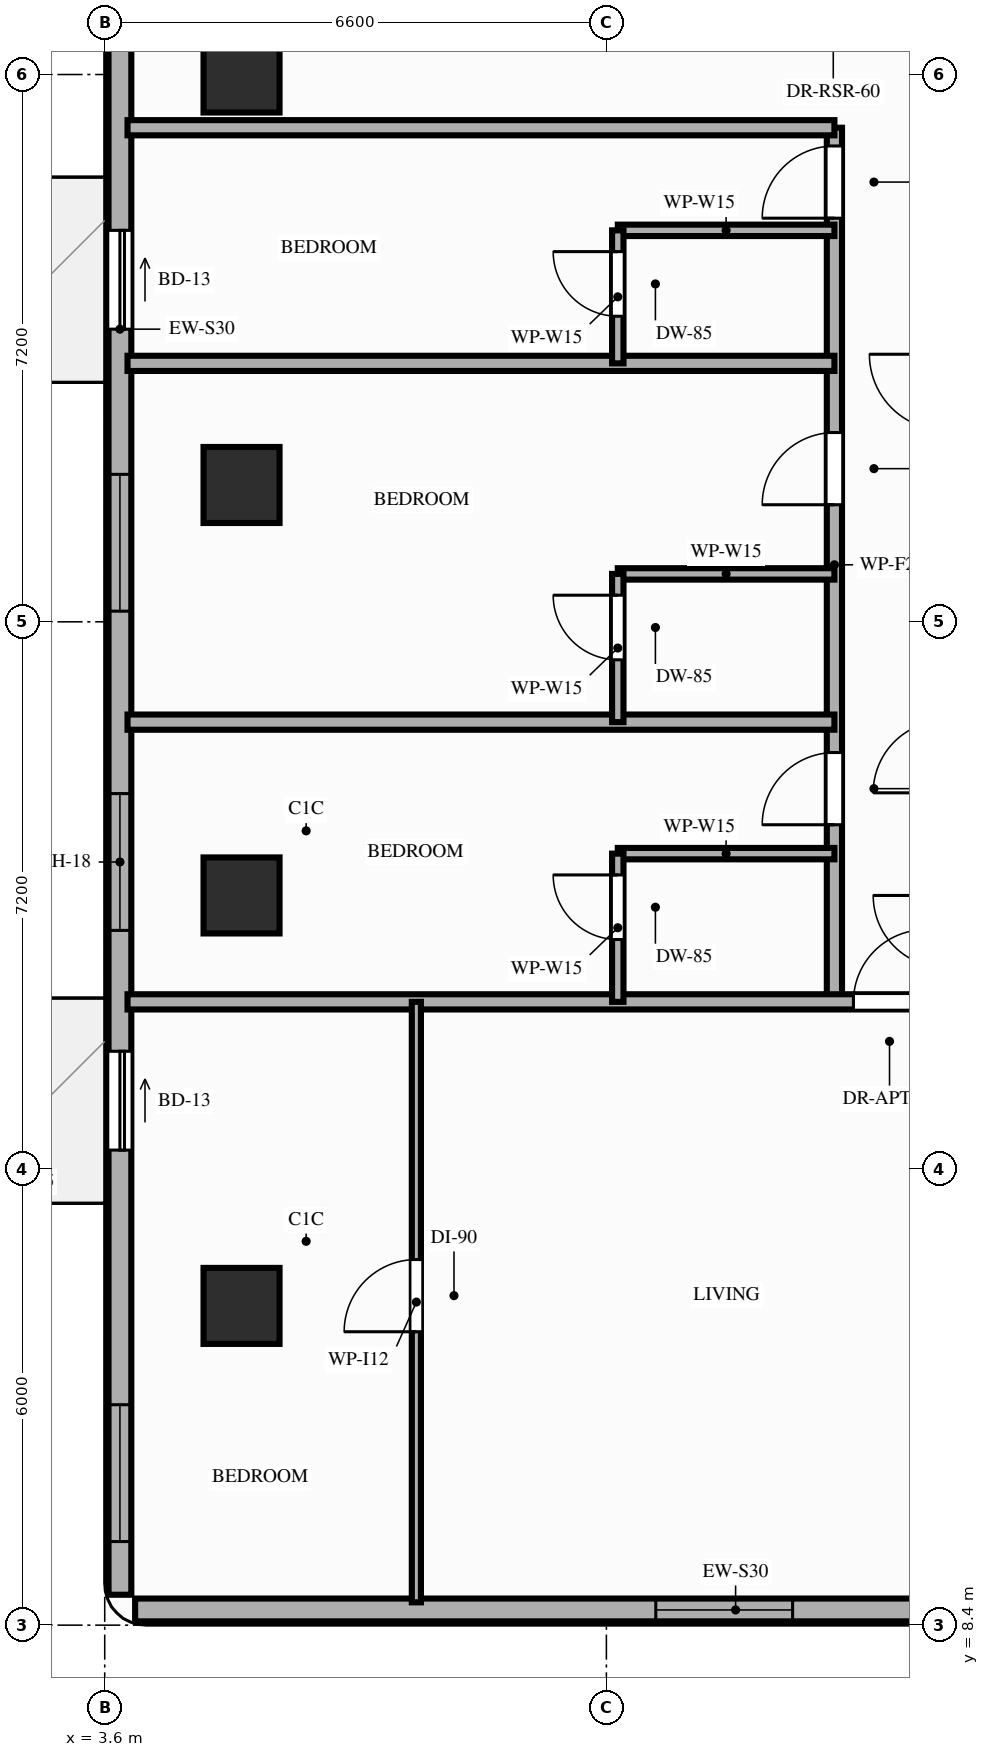
"""IFC4 building model, lengths in metres.
Left out: names, types, materials, properties, quantities, classifications, styles, units other than length and angle.
Written with IfcOpenShell. Run it as: python <this file> out.ifc"""

import sys

from ifc_helpers import new_model, si_unit, direction, frame, frame_2d, origin, origin_2d, place, context, subcontext, project, spatial, rectangle, extrude, element, fill, save


model = new_model("IFC4")
c1 = context("Model", 3, precision=1e-05, world=origin(), true_north=direction((0.0, 1.0)))
c2 = subcontext(c1, "Body", "Model", "MODEL_VIEW")
j1 = project(units=[si_unit("LENGTHUNIT", "METRE"), si_unit("PLANEANGLEUNIT", "RADIAN")], contexts=[c1])
p1 = place(None, origin())
s1 = spatial("IfcSite", under=j1, at=p1, CompositionType="ELEMENT")
p2 = place(p1, origin())
s2 = spatial("IfcBuilding", under=s1, at=p2, CompositionType="ELEMENT")
p3 = place(p2, frame((0.0, 0.0, 123.4)))
s3 = spatial("IfcBuildingStorey", under=s2, at=p3, CompositionType="ELEMENT", Elevation=123.4)
for number, where, z_axis, x_axis in (
    (1, (5.4, 12.6, 0.0), (0.0, 0.0, 1.0), (1.0, 0.0, 0.0)),
    (2, (5.4, 18.0, 0.0), (0.0, 0.0, 1.0), (1.0, 0.0, 0.0)),
    (3, (5.4, 23.4, 0.0), (0.0, 0.0, 1.0), (1.0, 0.0, 0.0)),
    (4, (5.4, 28.8, 0.0), (0.0, 0.0, 1.0), (1.0, 0.0, 0.0)),
):
    element("IfcColumn", number, at=place(p3, frame(where, z_axis=z_axis, x_axis=x_axis)), inside=s3, PredefinedType="COLUMN", context=c2, shape_type="SweptSolid", body=[
        extrude(rectangle(XDim=1.0, YDim=1.0, at=origin_2d()), origin(), (0.0, 0.0, 1.0), 3.2),
    ])
p4 = place(p3, frame((4.0, 8.6, 0.0), z_axis=(0.0, 0.0, 1.0), x_axis=(1.0, 0.0, 0.0)))
e5 = element("IfcWall", 5, at=p4, inside=s3, PredefinedType="STANDARD", context=c2, shape_type="SweptSolid", body=[
    extrude(rectangle(XDim=15.8, YDim=0.3, at=frame_2d((7.9, 0.0))), origin(), (0.0, 0.0, 1.0), 3.02),
])
p5 = place(p4, frame((6.85, 0.0, 0.85)))
e6 = element("IfcOpeningElement", 6, at=p5, cuts=e5, PredefinedType="OPENING", context=c2, shape_type="SweptSolid", body=[
    extrude(rectangle(XDim=1.8, YDim=1.75, at=frame_2d((0.9, 0.875))), frame((0.0, 0.16, 0.0), z_axis=(0.0, -1.0, 0.0), x_axis=(1.0, 0.0, 0.0)), (0.0, 0.0, 1.0), 0.32),
])
p6 = place(p3, frame((3.8, 42.1, 0.0), z_axis=(0.0, 0.0, 1.0), x_axis=(0.0, -1.0, 0.0)))
e7 = element("IfcWall", 7, at=p6, inside=s3, PredefinedType="STANDARD", context=c2, shape_type="SweptSolid", body=[
    extrude(rectangle(XDim=33.3, YDim=0.3, at=frame_2d((16.65, 0.0))), origin(), (0.0, 0.0, 1.0), 2.71),
])
p7 = place(p6, frame((26.15, 0.0, 0.0)))
e8 = element("IfcOpeningElement", 8, at=p7, cuts=e7, PredefinedType="OPENING", context=c2, shape_type="SweptSolid", body=[
    extrude(rectangle(XDim=1.3, YDim=2.08, at=frame_2d((0.65, 1.04))), frame((0.0, 0.16, 0.0), z_axis=(0.0, -1.0, 0.0), x_axis=(1.0, 0.0, 0.0)), (0.0, 0.0, 1.0), 0.32),
])
p8 = place(p6, frame((15.35, 0.0, 0.0)))
e9 = element("IfcOpeningElement", 9, at=p8, cuts=e7, PredefinedType="OPENING", context=c2, shape_type="SweptSolid", body=[
    extrude(rectangle(XDim=1.3, YDim=2.08, at=frame_2d((0.65, 1.04))), frame((0.0, 0.16, 0.0), z_axis=(0.0, -1.0, 0.0), x_axis=(1.0, 0.0, 0.0)), (0.0, 0.0, 1.0), 0.32),
])
p9 = place(p6, frame((22.76, 0.0, 0.85)))
e10 = element("IfcOpeningElement", 10, at=p9, cuts=e7, PredefinedType="OPENING", context=c2, shape_type="SweptSolid", body=[
    extrude(rectangle(XDim=1.8, YDim=1.61, at=frame_2d((0.9, 0.805))), frame((0.0, 0.16, 0.0), z_axis=(0.0, -1.0, 0.0), x_axis=(1.0, 0.0, 0.0)), (0.0, 0.0, 1.0), 0.32),
])
p10 = place(p6, frame((18.56, 0.0, 0.85)))
e11 = element("IfcOpeningElement", 11, at=p10, cuts=e7, PredefinedType="OPENING", context=c2, shape_type="SweptSolid", body=[
    extrude(rectangle(XDim=1.8, YDim=1.61, at=frame_2d((0.9, 0.805))), frame((0.0, 0.16, 0.0), z_axis=(0.0, -1.0, 0.0), x_axis=(1.0, 0.0, 0.0)), (0.0, 0.0, 1.0), 0.32),
])
p11 = place(p6, frame((30.8, 0.0, 0.85)))
e12 = element("IfcOpeningElement", 12, at=p11, cuts=e7, PredefinedType="OPENING", context=c2, shape_type="SweptSolid", body=[
    extrude(rectangle(XDim=1.8, YDim=1.61, at=frame_2d((0.9, 0.805))), frame((0.0, 0.16, 0.0), z_axis=(0.0, -1.0, 0.0), x_axis=(1.0, 0.0, 0.0)), (0.0, 0.0, 1.0), 0.32),
])
p12 = place(p6, frame((9.9, 0.0, 0.85)))
e13 = element("IfcOpeningElement", 13, at=p12, cuts=e7, PredefinedType="OPENING", context=c2, shape_type="SweptSolid", body=[
    extrude(rectangle(XDim=1.8, YDim=1.61, at=frame_2d((0.9, 0.805))), frame((0.0, 0.16, 0.0), z_axis=(0.0, -1.0, 0.0), x_axis=(1.0, 0.0, 0.0)), (0.0, 0.0, 1.0), 0.32),
])
p13 = place(p6, frame((3.8, 0.0, 0.85)))
e14 = element("IfcOpeningElement", 14, at=p13, cuts=e7, PredefinedType="OPENING", context=c2, shape_type="SweptSolid", body=[
    extrude(rectangle(XDim=1.8, YDim=1.61, at=frame_2d((0.9, 0.805))), frame((0.0, 0.16, 0.0), z_axis=(0.0, -1.0, 0.0), x_axis=(1.0, 0.0, 0.0)), (0.0, 0.0, 1.0), 0.32),
])
p14 = place(p3, frame((13.2, 16.6, 0.0), z_axis=(0.0, 0.0, 1.0), x_axis=(0.0, 1.0, 0.0)))
e15 = element("IfcWall", 15, at=p14, inside=s3, PredefinedType="PARTITIONING", context=c2, shape_type="SweptSolid", body=[
    extrude(rectangle(XDim=11.5, YDim=0.2, at=frame_2d((5.75, 0.0))), origin(), (0.0, 0.0, 1.0), 2.45),
])
p15 = place(p14, frame((2.33, 0.0, 0.0)))
e16 = element("IfcOpeningElement", 16, at=p15, cuts=e15, PredefinedType="OPENING", context=c2, shape_type="SweptSolid", body=[
    extrude(rectangle(XDim=0.95, YDim=2.15, at=frame_2d((0.475, 1.075))), frame((0.0, 0.11, 0.0), z_axis=(0.0, -1.0, 0.0), x_axis=(1.0, 0.0, 0.0)), (0.0, 0.0, 1.0), 0.22),
])
p16 = place(p14, frame((6.54, 0.0, 0.0)))
e17 = element("IfcOpeningElement", 17, at=p16, cuts=e15, PredefinedType="OPENING", context=c2, shape_type="SweptSolid", body=[
    extrude(rectangle(XDim=0.95, YDim=2.15, at=frame_2d((0.475, 1.075))), frame((0.0, 0.11, 0.0), z_axis=(0.0, -1.0, 0.0), x_axis=(1.0, 0.0, 0.0)), (0.0, 0.0, 1.0), 0.22),
])
p17 = place(p14, frame((10.31, 0.0, 0.0)))
e18 = element("IfcOpeningElement", 18, at=p17, cuts=e15, PredefinedType="OPENING", context=c2, shape_type="SweptSolid", body=[
    extrude(rectangle(XDim=0.95, YDim=2.15, at=frame_2d((0.475, 1.075))), frame((0.0, 0.11, 0.0), z_axis=(0.0, -1.0, 0.0), x_axis=(1.0, 0.0, 0.0)), (0.0, 0.0, 1.0), 0.22),
])
p18 = place(p3, frame((3.9, 16.6, 0.0), z_axis=(0.0, 0.0, 1.0), x_axis=(1.0, 0.0, 0.0)))
e19 = element("IfcWall", 19, at=p18, inside=s3, PredefinedType="PARTITIONING", context=c2, shape_type="SweptSolid", body=[
    extrude(rectangle(XDim=16.0, YDim=0.2, at=frame_2d((8.0, 0.0))), origin(), (0.0, 0.0, 1.0), 2.45),
])
p19 = place(p18, frame((9.55, 0.0, 0.0)))
e20 = element("IfcOpeningElement", 20, at=p19, cuts=e19, PredefinedType="OPENING", context=c2, shape_type="SweptSolid", body=[
    extrude(rectangle(XDim=0.95, YDim=2.15, at=frame_2d((0.475, 1.075))), frame((0.0, 0.11, 0.0), z_axis=(0.0, -1.0, 0.0), x_axis=(1.0, 0.0, 0.0)), (0.0, 0.0, 1.0), 0.22),
])
p20 = place(p3, frame((3.9, 28.1, 0.0), z_axis=(0.0, 0.0, 1.0), x_axis=(1.0, 0.0, 0.0)))
e21 = element("IfcWall", 21, at=p20, inside=s3, PredefinedType="PARTITIONING", context=c2, shape_type="SweptSolid", body=[
    extrude(rectangle(XDim=9.3, YDim=0.2, at=frame_2d((4.65, 0.0))), origin(), (0.0, 0.0, 1.0), 2.45),
])
p21 = place(p3, frame((10.35, 18.55, 0.0), z_axis=(0.0, 0.0, 1.0), x_axis=(1.0, 0.0, 0.0)))
e22 = element("IfcWall", 22, at=p21, inside=s3, PredefinedType="PARTITIONING", context=c2, shape_type="SweptSolid", body=[
    extrude(rectangle(XDim=2.85, YDim=0.15, at=frame_2d((1.425, 0.0))), origin(), (0.0, 0.0, 1.0), 3.02),
])
p22 = place(p3, frame((10.35, 16.6, 0.0), z_axis=(0.0, 0.0, 1.0), x_axis=(0.0, 1.0, 0.0)))
e23 = element("IfcWall", 23, at=p22, inside=s3, PredefinedType="PARTITIONING", context=c2, shape_type="SweptSolid", body=[
    extrude(rectangle(XDim=1.95, YDim=0.15, at=frame_2d((0.975, 0.0))), origin(), (0.0, 0.0, 1.0), 2.45),
])
p23 = place(p22, frame((0.82, 0.0, 0.0)))
e24 = element("IfcOpeningElement", 24, at=p23, cuts=e23, PredefinedType="OPENING", context=c2, shape_type="SweptSolid", body=[
    extrude(rectangle(XDim=0.85, YDim=2.1, at=frame_2d((0.425, 1.05))), frame((0.0, 0.085, 0.0), z_axis=(0.0, -1.0, 0.0), x_axis=(1.0, 0.0, 0.0)), (0.0, 0.0, 1.0), 0.17),
])
p24 = place(p3, frame((3.9, 20.28, 0.0), z_axis=(0.0, 0.0, 1.0), x_axis=(1.0, 0.0, 0.0)))
e25 = element("IfcWall", 25, at=p24, inside=s3, PredefinedType="PARTITIONING", context=c2, shape_type="SweptSolid", body=[
    extrude(rectangle(XDim=9.3, YDim=0.2, at=frame_2d((4.65, 0.0))), origin(), (0.0, 0.0, 1.0), 2.45),
])
p25 = place(p3, frame((10.35, 22.23, 0.0), z_axis=(0.0, 0.0, 1.0), x_axis=(1.0, 0.0, 0.0)))
e26 = element("IfcWall", 26, at=p25, inside=s3, PredefinedType="PARTITIONING", context=c2, shape_type="SweptSolid", body=[
    extrude(rectangle(XDim=2.85, YDim=0.15, at=frame_2d((1.425, 0.0))), origin(), (0.0, 0.0, 1.0), 3.02),
])
p26 = place(p3, frame((10.35, 20.28, 0.0), z_axis=(0.0, 0.0, 1.0), x_axis=(0.0, 1.0, 0.0)))
e27 = element("IfcWall", 27, at=p26, inside=s3, PredefinedType="PARTITIONING", context=c2, shape_type="SweptSolid", body=[
    extrude(rectangle(XDim=1.95, YDim=0.15, at=frame_2d((0.975, 0.0))), origin(), (0.0, 0.0, 1.0), 2.71),
])
p27 = place(p26, frame((0.82, 0.0, 0.0)))
e28 = element("IfcOpeningElement", 28, at=p27, cuts=e27, PredefinedType="OPENING", context=c2, shape_type="SweptSolid", body=[
    extrude(rectangle(XDim=0.85, YDim=2.1, at=frame_2d((0.425, 1.05))), frame((0.0, 0.085, 0.0), z_axis=(0.0, -1.0, 0.0), x_axis=(1.0, 0.0, 0.0)), (0.0, 0.0, 1.0), 0.17),
])
p28 = place(p3, frame((3.9, 25.0, 0.0), z_axis=(0.0, 0.0, 1.0), x_axis=(1.0, 0.0, 0.0)))
e29 = element("IfcWall", 29, at=p28, inside=s3, PredefinedType="PARTITIONING", context=c2, shape_type="SweptSolid", body=[
    extrude(rectangle(XDim=9.3, YDim=0.2, at=frame_2d((4.65, 0.0))), origin(), (0.0, 0.0, 1.0), 2.45),
])
p29 = place(p3, frame((10.35, 26.75, 0.0), z_axis=(0.0, 0.0, 1.0), x_axis=(1.0, 0.0, 0.0)))
e30 = element("IfcWall", 30, at=p29, inside=s3, PredefinedType="PARTITIONING", context=c2, shape_type="SweptSolid", body=[
    extrude(rectangle(XDim=2.85, YDim=0.15, at=frame_2d((1.425, 0.0))), origin(), (0.0, 0.0, 1.0), 2.6),
])
p30 = place(p3, frame((10.35, 25.0, 0.0), z_axis=(0.0, 0.0, 1.0), x_axis=(0.0, 1.0, 0.0)))
e31 = element("IfcWall", 31, at=p30, inside=s3, PredefinedType="PARTITIONING", context=c2, shape_type="SweptSolid", body=[
    extrude(rectangle(XDim=1.75, YDim=0.15, at=frame_2d((0.875, 0.0))), origin(), (0.0, 0.0, 1.0), 2.6),
])
p31 = place(p30, frame((0.62, 0.0, 0.0)))
e32 = element("IfcOpeningElement", 32, at=p31, cuts=e31, PredefinedType="OPENING", context=c2, shape_type="SweptSolid", body=[
    extrude(rectangle(XDim=0.85, YDim=2.1, at=frame_2d((0.425, 1.05))), frame((0.0, 0.085, 0.0), z_axis=(0.0, -1.0, 0.0), x_axis=(1.0, 0.0, 0.0)), (0.0, 0.0, 1.0), 0.17),
])
p32 = place(p3, frame((7.7, 8.7, 0.0), z_axis=(0.0, 0.0, 1.0), x_axis=(0.0, 1.0, 0.0)))
e33 = element("IfcWall", 33, at=p32, inside=s3, PredefinedType="PARTITIONING", context=c2, shape_type="SweptSolid", body=[
    extrude(rectangle(XDim=7.9, YDim=0.12, at=frame_2d((3.95, 0.0))), origin(), (0.0, 0.0, 1.0), 2.45),
])
p33 = place(p32, frame((3.56, 0.0, 0.0)))
e34 = element("IfcOpeningElement", 34, at=p33, cuts=e33, PredefinedType="OPENING", context=c2, shape_type="SweptSolid", body=[
    extrude(rectangle(XDim=0.95, YDim=2.15, at=frame_2d((0.475, 1.075))), frame((0.0, 0.07, 0.0), z_axis=(0.0, -1.0, 0.0), x_axis=(1.0, 0.0, 0.0)), (0.0, 0.0, 1.0), 0.14),
])
p34 = place(p7, origin())
e35 = element("IfcDoor", 35, at=p34, inside=s3, OperationType="SLIDING_TO_LEFT", PredefinedType="DOOR", context=c2, shape_type="SweptSolid", body=[
    extrude(rectangle(XDim=1.3, YDim=2.08, at=frame_2d((0.65, 1.04))), frame((0.0, 0.025, 0.0), z_axis=(0.0, -1.0, 0.0), x_axis=(1.0, 0.0, 0.0)), (0.0, 0.0, 1.0), 0.05),
])
fill(e8, e35)
p35 = place(p8, origin())
e36 = element("IfcDoor", 36, at=p35, inside=s3, OperationType="SLIDING_TO_LEFT", PredefinedType="DOOR", context=c2, shape_type="SweptSolid", body=[
    extrude(rectangle(XDim=1.3, YDim=2.08, at=frame_2d((0.65, 1.04))), frame((0.0, 0.025, 0.0), z_axis=(0.0, -1.0, 0.0), x_axis=(1.0, 0.0, 0.0)), (0.0, 0.0, 1.0), 0.05),
])
fill(e9, e36)
p36 = place(p9, origin())
e37 = element("IfcWindow", 37, at=p36, inside=s3, PartitioningType="SINGLE_PANEL", PredefinedType="WINDOW", context=c2, shape_type="SweptSolid", body=[
    extrude(rectangle(XDim=1.8, YDim=1.61, at=frame_2d((0.9, 0.805))), frame((0.0, 0.03, 0.0), z_axis=(0.0, -1.0, 0.0), x_axis=(1.0, 0.0, 0.0)), (0.0, 0.0, 1.0), 0.06),
])
fill(e10, e37)
p37 = place(p10, origin())
e38 = element("IfcWindow", 38, at=p37, inside=s3, PartitioningType="SINGLE_PANEL", PredefinedType="WINDOW", context=c2, shape_type="SweptSolid", body=[
    extrude(rectangle(XDim=1.8, YDim=1.61, at=frame_2d((0.9, 0.805))), frame((0.0, 0.03, 0.0), z_axis=(0.0, -1.0, 0.0), x_axis=(1.0, 0.0, 0.0)), (0.0, 0.0, 1.0), 0.06),
])
fill(e11, e38)
p38 = place(p5, origin())
e39 = element("IfcWindow", 39, at=p38, inside=s3, PartitioningType="SINGLE_PANEL", PredefinedType="WINDOW", context=c2, shape_type="SweptSolid", body=[
    extrude(rectangle(XDim=1.8, YDim=1.75, at=frame_2d((0.9, 0.875))), frame((0.0, 0.03, 0.0), z_axis=(0.0, -1.0, 0.0), x_axis=(1.0, 0.0, 0.0)), (0.0, 0.0, 1.0), 0.06),
])
fill(e6, e39)
p39 = place(p11, origin())
e40 = element("IfcWindow", 40, at=p39, inside=s3, PartitioningType="SINGLE_PANEL", PredefinedType="WINDOW", context=c2, shape_type="SweptSolid", body=[
    extrude(rectangle(XDim=1.8, YDim=1.61, at=frame_2d((0.9, 0.805))), frame((0.0, 0.03, 0.0), z_axis=(0.0, -1.0, 0.0), x_axis=(1.0, 0.0, 0.0)), (0.0, 0.0, 1.0), 0.06),
])
fill(e12, e40)
p40 = place(p23, origin())
e41 = element("IfcDoor", 41, at=p40, inside=s3, OperationType="SINGLE_SWING_RIGHT", PredefinedType="DOOR", context=c2, shape_type="SweptSolid", body=[
    extrude(rectangle(XDim=0.85, YDim=2.1, at=frame_2d((0.425, 1.05))), frame((0.0, 0.025, 0.0), z_axis=(0.0, -1.0, 0.0), x_axis=(1.0, 0.0, 0.0)), (0.0, 0.0, 1.0), 0.05),
])
fill(e24, e41)
p41 = place(p15, origin())
e42 = element("IfcDoor", 42, at=p41, inside=s3, OperationType="SINGLE_SWING_LEFT", PredefinedType="DOOR", context=c2, shape_type="SweptSolid", body=[
    extrude(rectangle(XDim=0.95, YDim=2.15, at=frame_2d((0.475, 1.075))), frame((0.0, 0.025, 0.0), z_axis=(0.0, -1.0, 0.0), x_axis=(1.0, 0.0, 0.0)), (0.0, 0.0, 1.0), 0.05),
])
fill(e16, e42)
p42 = place(p27, origin())
e43 = element("IfcDoor", 43, at=p42, inside=s3, OperationType="SINGLE_SWING_RIGHT", PredefinedType="DOOR", context=c2, shape_type="SweptSolid", body=[
    extrude(rectangle(XDim=0.85, YDim=2.1, at=frame_2d((0.425, 1.05))), frame((0.0, 0.025, 0.0), z_axis=(0.0, -1.0, 0.0), x_axis=(1.0, 0.0, 0.0)), (0.0, 0.0, 1.0), 0.05),
])
fill(e28, e43)
p43 = place(p16, origin())
e44 = element("IfcDoor", 44, at=p43, inside=s3, OperationType="SINGLE_SWING_LEFT", PredefinedType="DOOR", context=c2, shape_type="SweptSolid", body=[
    extrude(rectangle(XDim=0.95, YDim=2.15, at=frame_2d((0.475, 1.075))), frame((0.0, 0.025, 0.0), z_axis=(0.0, -1.0, 0.0), x_axis=(1.0, 0.0, 0.0)), (0.0, 0.0, 1.0), 0.05),
])
fill(e17, e44)
p44 = place(p31, origin())
e45 = element("IfcDoor", 45, at=p44, inside=s3, OperationType="SINGLE_SWING_RIGHT", PredefinedType="DOOR", context=c2, shape_type="SweptSolid", body=[
    extrude(rectangle(XDim=0.85, YDim=2.1, at=frame_2d((0.425, 1.05))), frame((0.0, 0.025, 0.0), z_axis=(0.0, -1.0, 0.0), x_axis=(1.0, 0.0, 0.0)), (0.0, 0.0, 1.0), 0.05),
])
fill(e32, e45)
p45 = place(p17, origin())
e46 = element("IfcDoor", 46, at=p45, inside=s3, OperationType="SINGLE_SWING_LEFT", PredefinedType="DOOR", context=c2, shape_type="SweptSolid", body=[
    extrude(rectangle(XDim=0.95, YDim=2.15, at=frame_2d((0.475, 1.075))), frame((0.0, 0.025, 0.0), z_axis=(0.0, -1.0, 0.0), x_axis=(1.0, 0.0, 0.0)), (0.0, 0.0, 1.0), 0.05),
])
fill(e18, e46)
p46 = place(p19, origin())
e47 = element("IfcDoor", 47, at=p46, inside=s3, OperationType="SINGLE_SWING_RIGHT", PredefinedType="DOOR", context=c2, shape_type="SweptSolid", body=[
    extrude(rectangle(XDim=0.95, YDim=2.15, at=frame_2d((0.475, 1.075))), frame((0.0, 0.025, 0.0), z_axis=(0.0, -1.0, 0.0), x_axis=(1.0, 0.0, 0.0)), (0.0, 0.0, 1.0), 0.05),
])
fill(e20, e47)
p47 = place(p33, origin())
e48 = element("IfcDoor", 48, at=p47, inside=s3, OperationType="SINGLE_SWING_LEFT", PredefinedType="DOOR", context=c2, shape_type="SweptSolid", body=[
    extrude(rectangle(XDim=0.95, YDim=2.15, at=frame_2d((0.475, 1.075))), frame((0.0, 0.025, 0.0), z_axis=(0.0, -1.0, 0.0), x_axis=(1.0, 0.0, 0.0)), (0.0, 0.0, 1.0), 0.05),
])
fill(e34, e48)
save(model, sys.argv[1])
